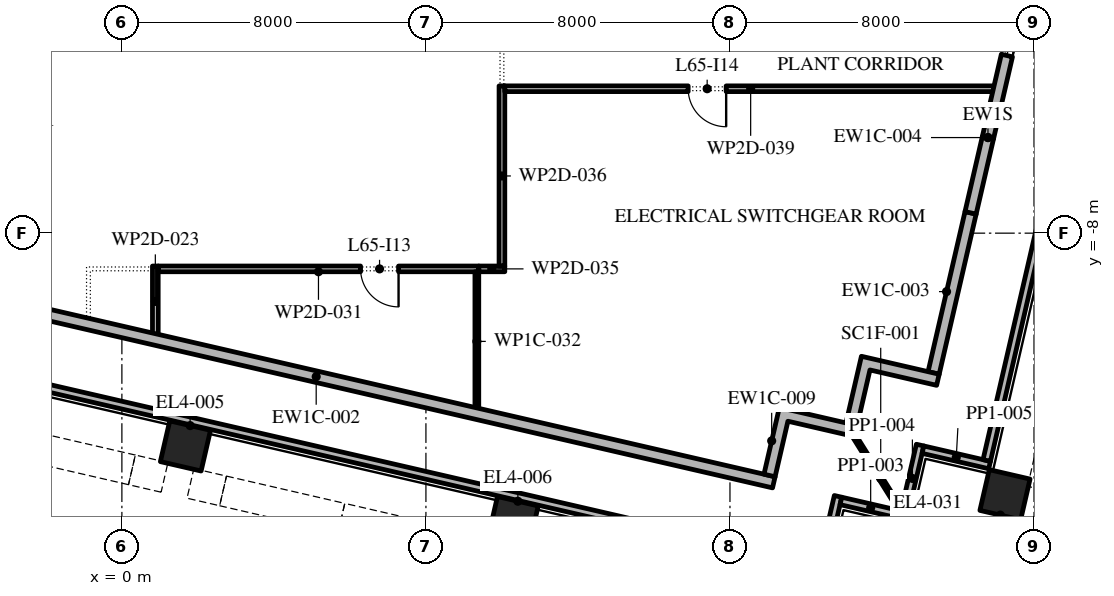
"""IFC4 building model, lengths in metres.
Left out: names, types, materials, properties, quantities, classifications, styles, units other than length and angle.
Written with IfcOpenShell. Run it as: python <this file> out.ifc"""

import sys

from ifc_helpers import new_model, si_unit, direction, frame, frame_2d, origin, origin_2d, place, context, subcontext, project, spatial, polyline, rectangle, outline, extrude, element, fill, save


model = new_model("IFC4")
c1 = context("Model", 3, precision=1e-05, world=origin(), true_north=direction((0.0, 1.0)))
c2 = subcontext(c1, "Body", "Model", "MODEL_VIEW")
j1 = project(units=[si_unit("LENGTHUNIT", "METRE"), si_unit("PLANEANGLEUNIT", "RADIAN")], contexts=[c1])
p1 = place(None, origin())
s1 = spatial("IfcSite", under=j1, at=p1, CompositionType="ELEMENT")
p2 = place(p1, origin())
s2 = spatial("IfcBuilding", under=s1, at=p2, CompositionType="ELEMENT")
p3 = place(p2, frame((0.0, 0.0, 297.6)))
s3 = spatial("IfcBuildingStorey", under=s2, at=p3, CompositionType="ELEMENT", Elevation=297.6)
for number, where, z_axis, x_axis in (
    (1, (1.672, -13.599, 0.0), (0.0, 0.0, 1.0), (0.974, -0.225, 0.0)),
    (2, (10.295, -15.59, 0.0), (0.0, 0.0, 1.0), (0.974, -0.225, 0.0)),
    (3, (23.236, -14.883, 0.0), (0.0, 0.0, 1.0), (0.974, -0.225, 0.0)),
):
    element("IfcColumn", number, at=place(p3, frame(where, z_axis=z_axis, x_axis=x_axis)), inside=s3, PredefinedType="COLUMN", context=c2, shape_type="SweptSolid", body=[
        extrude(rectangle(XDim=1.1, YDim=1.1, at=origin_2d()), origin(), (0.0, 0.0, 1.0), 5.4),
    ])
p4 = place(p3, frame((21.359, -11.678, 0.0), z_axis=(0.0, 0.0, 1.0), x_axis=(0.224917244583, 0.974377869766, 0.0)))
e4 = element("IfcWall", 4, at=p4, inside=s3, PredefinedType="STANDARD", context=c2, shape_type="SweptSolid", body=[
    extrude(rectangle(XDim=4.323, YDim=0.3, at=frame_2d((2.162, 0.0))), origin(), (0.0, 0.0, 1.0), 4.95),
])
p5 = place(p3, origin())
e5 = element("IfcWall", 5, at=p5, inside=s3, PredefinedType="STANDARD", context=c2, shape_type="SweptSolid", body=[
    extrude(outline(polyline([(19.054, -12.993), (19.459, -11.24), (21.505, -11.712), (21.438, -12.004), (19.684, -11.599), (19.279, -13.353), (17.525, -12.948), (17.188, -14.41), (16.895, -14.342), (17.3, -12.588), (19.054, -12.993)])), origin(), (0.0, 0.0, 1.0), 4.95),
])
p6 = place(p3, frame((-31.919, -5.156, -0.05), z_axis=(0.0, 0.0, 1.0), x_axis=(0.974370681559, -0.224948382787, 0.0)))
e6 = element("IfcWall", 6, at=p6, inside=s3, PredefinedType="STANDARD", context=c2, shape_type="SweptSolid", body=[
    extrude(rectangle(XDim=51.76, YDim=0.2, at=frame_2d((25.88, 0.0))), origin(), (0.0, 0.0, 1.0), 1.1),
])
p7 = place(p3, frame((18.439, -16.679, -0.05), z_axis=(0.0, 0.0, 1.0), x_axis=(0.224879318197, 0.974386623598, 0.0)))
e7 = element("IfcWall", 7, at=p7, inside=s3, PredefinedType="STANDARD", context=c2, shape_type="SweptSolid", body=[
    extrude(rectangle(XDim=1.8, YDim=0.2, at=frame_2d((0.9, 0.0))), origin(), (0.0, 0.0, 1.0), 1.1),
])
p8 = place(p3, frame((18.919, -15.046, -0.05), z_axis=(0.0, 0.0, 1.0), x_axis=(0.97439375443, -0.224848418559, 0.0)))
e8 = element("IfcWall", 8, at=p8, inside=s3, PredefinedType="STANDARD", context=c2, shape_type="SweptSolid", body=[
    extrude(rectangle(XDim=1.608, YDim=0.2, at=frame_2d((0.804, 0.0))), origin(), (0.0, 0.0, 1.0), 1.1),
])
p9 = place(p3, frame((20.598, -15.331, -0.05), z_axis=(0.0, 0.0, 1.0), x_axis=(0.225008086135, 0.974356896201, 0.0)))
e9 = element("IfcWall", 9, at=p9, inside=s3, PredefinedType="STANDARD", context=c2, shape_type="SweptSolid", body=[
    extrude(rectangle(XDim=1.8, YDim=0.2, at=frame_2d((0.9, 0.0))), origin(), (0.0, 0.0, 1.0), 1.1),
])
p10 = place(p3, frame((21.078, -13.697, -0.05), z_axis=(0.0, 0.0, 1.0), x_axis=(0.974350028141, -0.22503782496, 0.0)))
e10 = element("IfcWall", 10, at=p10, inside=s3, PredefinedType="STANDARD", context=c2, shape_type="SweptSolid", body=[
    extrude(rectangle(XDim=1.8, YDim=0.2, at=frame_2d((0.9, 0.0))), origin(), (0.0, 0.0, 1.0), 1.1),
])
p11 = place(p3, frame((22.757, -13.982, -0.05), z_axis=(0.0, 0.0, 1.0), x_axis=(0.224947491476, 0.974370887331, 0.0)))
e11 = element("IfcWall", 11, at=p11, inside=s3, PredefinedType="STANDARD", context=c2, shape_type="SweptSolid", body=[
    extrude(rectangle(XDim=58.769, YDim=0.2, at=frame_2d((29.385, 0.0))), origin(), (0.0, 0.0, 1.0), 1.1),
])
p12 = place(p3, frame((19.279, -13.353, -0.05), z_axis=(0.0, 0.0, 1.0), x_axis=(0.529914407191, -0.848051131154, 0.0)))
e12 = element("IfcWall", 12, at=p12, inside=s3, PredefinedType="STANDARD", context=c2, shape_type="SweptSolid", body=[
    extrude(rectangle(XDim=2.596, YDim=0.1, at=frame_2d((1.298, 0.0))), origin(), (0.0, 0.0, 1.0), 5.0),
])
p13 = place(p3, frame((0.88, -8.865, 0.0), z_axis=(0.0, 0.0, 1.0), x_axis=(0.0, -1.0, 0.0)))
e13 = element("IfcWall", 13, at=p13, inside=s3, PredefinedType="PARTITIONING", context=c2, shape_type="SweptSolid", body=[
    extrude(rectangle(XDim=1.863, YDim=0.15, at=frame_2d((0.932, 0.0))), origin(), (0.0, 0.0, 1.0), 4.95),
])
p14 = place(p3, frame((9.39, -8.94, 0.0), z_axis=(0.0, 0.0, 1.0), x_axis=(-1.0, 0.0, 0.0)))
e14 = element("IfcWall", 14, at=p14, inside=s3, PredefinedType="PARTITIONING", context=c2, shape_type="SweptSolid", body=[
    extrude(rectangle(XDim=8.435, YDim=0.15, at=frame_2d((4.217, 0.0))), origin(), (0.0, 0.0, 1.0), 4.95),
])
p15 = place(p14, frame((2.11, 0.0, 0.0)))
e15 = element("IfcOpeningElement", 15, at=p15, cuts=e14, PredefinedType="OPENING", context=c2, shape_type="SweptSolid", body=[
    extrude(rectangle(XDim=1.0, YDim=2.1, at=frame_2d((0.5, 1.05))), frame((0.0, 0.085, 0.0), z_axis=(0.0, -1.0, 0.0), x_axis=(1.0, 0.0, 0.0)), (0.0, 0.0, 1.0), 0.17),
])
p16 = place(p3, frame((9.34, -9.015, 0.0), z_axis=(0.0, 0.0, 1.0), x_axis=(0.0, -1.0, 0.0)))
e16 = element("IfcWall", 16, at=p16, inside=s3, PredefinedType="PARTITIONING", context=c2, shape_type="SweptSolid", body=[
    extrude(rectangle(XDim=3.666, YDim=0.1, at=frame_2d((1.833, 0.0))), origin(), (0.0, 0.0, 1.0), 4.95),
])
p17 = place(p3, frame((10.075, -8.94, 0.0), z_axis=(0.0, 0.0, 1.0), x_axis=(-1.0, 0.0, 0.0)))
e17 = element("IfcWall", 17, at=p17, inside=s3, PredefinedType="PARTITIONING", context=c2, shape_type="SweptSolid", body=[
    extrude(rectangle(XDim=0.685, YDim=0.15, at=frame_2d((0.343, 0.0))), origin(), (0.0, 0.0, 1.0), 4.95),
])
p18 = place(p3, frame((10.0, -4.125, 0.0), z_axis=(0.0, 0.0, 1.0), x_axis=(0.0, -1.0, 0.0)))
e18 = element("IfcWall", 18, at=p18, inside=s3, PredefinedType="PARTITIONING", context=c2, shape_type="SweptSolid", body=[
    extrude(rectangle(XDim=4.74, YDim=0.15, at=frame_2d((2.37, 0.0))), origin(), (0.0, 0.0, 1.0), 4.95),
])
p19 = place(p3, frame((23.014, -4.2, 0.0), z_axis=(0.0, 0.0, 1.0), x_axis=(-1.0, 0.0, 0.0)))
e19 = element("IfcWall", 19, at=p19, inside=s3, PredefinedType="PARTITIONING", context=c2, shape_type="SweptSolid", body=[
    extrude(rectangle(XDim=12.939, YDim=0.15, at=frame_2d((6.469, 0.0))), origin(), (0.0, 0.0, 1.0), 4.95),
])
p20 = place(p19, frame((7.114, 0.0, 0.0)))
e20 = element("IfcOpeningElement", 20, at=p20, cuts=e19, PredefinedType="OPENING", context=c2, shape_type="SweptSolid", body=[
    extrude(rectangle(XDim=1.0, YDim=2.1, at=frame_2d((0.5, 1.05))), frame((0.0, 0.085, 0.0), z_axis=(0.0, -1.0, 0.0), x_axis=(1.0, 0.0, 0.0)), (0.0, 0.0, 1.0), 0.17),
])
p21 = place(p3, frame((-6.928, -8.996, 0.0), z_axis=(0.0, 0.0, 1.0), x_axis=(0.974370214698, -0.224950404997, 0.0)))
e21 = element("IfcWall", 21, at=p21, inside=s3, PredefinedType="STANDARD", context=c2, shape_type="SweptSolid", body=[
    extrude(rectangle(XDim=24.716, YDim=0.3, at=frame_2d((12.358, 0.0))), origin(), (0.0, 0.0, 1.0), 4.95),
])
p22 = place(p3, frame((22.331, -7.466, 0.0), z_axis=(0.0, 0.0, 1.0), x_axis=(0.225061237367, 0.974344620468, 0.0)))
e22 = element("IfcWall", 22, at=p22, inside=s3, PredefinedType="STANDARD", context=c2, shape_type="SweptSolid", body=[
    extrude(rectangle(XDim=2.033, YDim=0.3, at=frame_2d((1.017, 0.0))), origin(), (0.0, 0.0, 1.0), 4.64),
])
p23 = place(p3, frame((22.789, -5.485, 0.0), z_axis=(0.0, 0.0, 1.0), x_axis=(0.224937970591, 0.974373085315, 0.0)))
e23 = element("IfcWall", 23, at=p23, inside=s3, PredefinedType="STANDARD", context=c2, shape_type="SweptSolid", body=[
    extrude(rectangle(XDim=23.406, YDim=0.3, at=frame_2d((11.703, 0.0))), origin(), (0.0, 0.0, 1.0), 4.95),
])
p24 = place(p23, frame((2.215, 0.0, 0.6)))
e24 = element("IfcOpeningElement", 24, at=p24, cuts=e23, PredefinedType="OPENING", context=c2, shape_type="SweptSolid", body=[
    extrude(rectangle(XDim=3.6, YDim=3.8, at=frame_2d((1.8, 1.9))), frame((0.0, 0.16, 0.0), z_axis=(0.0, -1.0, 0.0), x_axis=(1.0, 0.0, 0.0)), (0.0, 0.0, 1.0), 0.32),
])
p25 = place(p23, frame((9.329, 0.0, 0.6)))
e25 = element("IfcOpeningElement", 25, at=p25, cuts=e23, PredefinedType="OPENING", context=c2, shape_type="SweptSolid", body=[
    extrude(rectangle(XDim=3.6, YDim=3.85, at=frame_2d((1.8, 1.925))), frame((0.0, 0.16, 0.0), z_axis=(0.0, -1.0, 0.0), x_axis=(1.0, 0.0, 0.0)), (0.0, 0.0, 1.0), 0.32),
])
p26 = place(p24, origin())
e26 = element("IfcWindow", 26, at=p26, inside=s3, PartitioningType="DOUBLE_PANEL_HORIZONTAL", PredefinedType="WINDOW", context=c2, shape_type="SweptSolid", body=[
    extrude(rectangle(XDim=3.6, YDim=3.8, at=frame_2d((1.8, 1.9))), frame((0.0, 0.03, 0.0), z_axis=(0.0, -1.0, 0.0), x_axis=(1.0, 0.0, 0.0)), (0.0, 0.0, 1.0), 0.06),
])
fill(e24, e26)
p27 = place(p15, origin())
e27 = element("IfcDoor", 27, at=p27, inside=s3, OperationType="SINGLE_SWING_RIGHT", PredefinedType="DOOR", context=c2, shape_type="SweptSolid", body=[
    extrude(rectangle(XDim=1.0, YDim=2.1, at=frame_2d((0.5, 1.05))), frame((0.0, 0.025, 0.0), z_axis=(0.0, -1.0, 0.0), x_axis=(1.0, 0.0, 0.0)), (0.0, 0.0, 1.0), 0.05),
])
fill(e15, e27)
p28 = place(p20, origin())
e28 = element("IfcDoor", 28, at=p28, inside=s3, OperationType="SINGLE_SWING_RIGHT", PredefinedType="DOOR", context=c2, shape_type="SweptSolid", body=[
    extrude(rectangle(XDim=1.0, YDim=2.1, at=frame_2d((0.5, 1.05))), frame((0.0, 0.025, 0.0), z_axis=(0.0, -1.0, 0.0), x_axis=(1.0, 0.0, 0.0)), (0.0, 0.0, 1.0), 0.05),
])
fill(e20, e28)
save(model, sys.argv[1])
